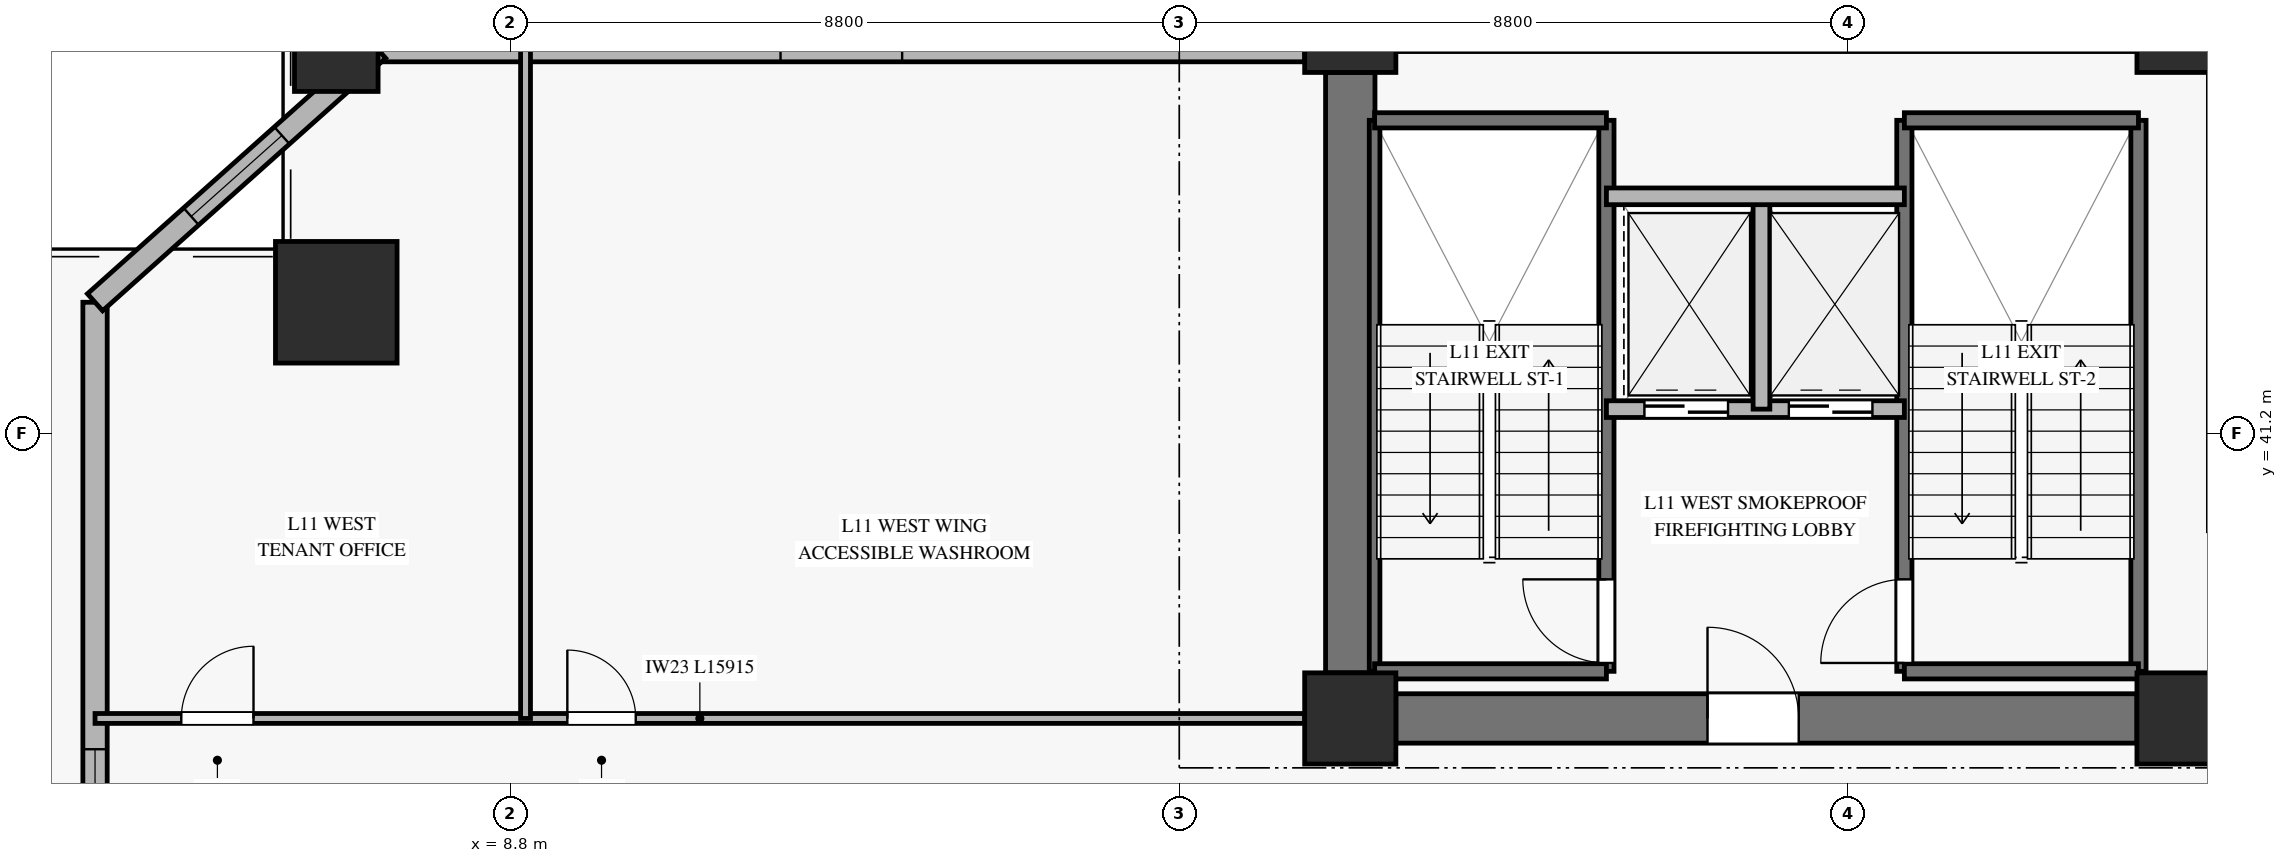
"""IFC4 building model, lengths in metres.
Left out: names, types, materials, properties, quantities, classifications, styles, units other than length and angle.
Written with IfcOpenShell. Run it as: python <this file> out.ifc"""

import sys

from ifc_helpers import new_model, si_unit, direction, frame, frame_2d, origin, origin_2d, place, context, subcontext, project, spatial, rectangle, hollow_rectangle, extrude, source, transform, mapped, element, fill, save


model = new_model("IFC4")
c1 = context("Model", 3, precision=1e-05, world=origin(), true_north=direction((0.0, 1.0)))
c2 = subcontext(c1, "Body", "Model", "MODEL_VIEW")
j1 = project(units=[si_unit("LENGTHUNIT", "METRE"), si_unit("PLANEANGLEUNIT", "RADIAN")], contexts=[c1])
p1 = place(None, origin())
s1 = spatial("IfcSite", under=j1, at=p1, CompositionType="ELEMENT")
p2 = place(p1, origin())
s2 = spatial("IfcBuilding", under=s1, at=p2, CompositionType="ELEMENT")
p3 = place(p2, frame((0.0, 0.0, 44.9)))
s3 = spatial("IfcBuildingStorey", under=s2, at=p3, CompositionType="ELEMENT", Elevation=44.9)
m1 = source(origin(), c2, "Body", "SweptSolid", [
    extrude(rectangle(XDim=1.2, YDim=1.2, at=origin_2d()), origin(), (0.0, 0.0, 1.0), 3.62),
])
for number, where, z_axis, x_axis in (
    (1, (19.85, 37.45, 0.0), (0.0, 0.0, 1.0), (1.0, 0.0, 0.0)),
    (2, (19.85, 46.55, 0.0), (0.0, 0.0, 1.0), (1.0, 0.0, 0.0)),
    (3, (30.8, 37.45, 0.0), (0.0, 0.0, 1.0), (1.0, 0.0, 0.0)),
    (4, (30.8, 46.55, 0.0), (0.0, 0.0, 1.0), (1.0, 0.0, 0.0)),
):
    element("IfcColumn", number, at=place(p3, frame(where, z_axis=z_axis, x_axis=x_axis)), inside=s3, PredefinedType="PILASTER", context=c2, shape_type="MappedRepresentation", body=[
        mapped(m1, transform((0.0, 0.0, 0.0), x_axis=(1.0, 0.0, 0.0), y_axis=(0.0, 1.0, 0.0), z_axis=(0.0, 0.0, 1.0), scale=1.0)),
    ])
p4 = place(p3, frame((20.45, 37.45, 0.0), z_axis=(0.0, 0.0, 1.0), x_axis=(1.0, 0.0, 0.0)))
e5 = element("IfcWall", 5, at=p4, inside=s3, PredefinedType="SHEAR", context=c2, shape_type="SweptSolid", body=[
    extrude(rectangle(XDim=9.75, YDim=0.65, at=frame_2d((4.875, 0.0))), origin(), (0.0, 0.0, 1.0), 3.62),
])
p5 = place(p4, frame((4.1, 0.0, 0.0)))
e6 = element("IfcOpeningElement", 6, at=p5, cuts=e5, PredefinedType="OPENING", context=c2, shape_type="SweptSolid", body=[
    extrude(rectangle(XDim=1.2, YDim=2.15, at=frame_2d((0.6, 1.075))), frame((0.0, 0.335, 0.0), z_axis=(0.0, -1.0, 0.0), x_axis=(1.0, 0.0, 0.0)), (0.0, 0.0, 1.0), 0.67),
])
p6 = place(p3, frame((19.85, 38.05, 0.0), z_axis=(0.0, 0.0, 1.0), x_axis=(0.0, 1.0, 0.0)))
e7 = element("IfcWall", 7, at=p6, inside=s3, PredefinedType="SHEAR", context=c2, shape_type="SweptSolid", body=[
    extrude(rectangle(XDim=7.9, YDim=0.65, at=frame_2d((3.95, 0.0))), origin(), (0.0, 0.0, 1.0), 3.62),
])
m2 = source(origin(), c2, "Body", "SweptSolid", [
    extrude(hollow_rectangle(XDim=1.6, YDim=1.6, WallThickness=0.075, at=origin_2d()), origin(), (0.0, 0.0, 1.0), 3.626),
])
p7 = place(p3, frame((6.509, 42.926, 0.0), z_axis=(0.057631200614, 0.007136573908, 0.998312433073), x_axis=(-0.122893119903, 0.992419911671, 0.0)))
e8 = element("IfcColumn", 8, at=p7, inside=s3, PredefinedType="COLUMN", context=c2, shape_type="MappedRepresentation", body=[
    mapped(m2, transform((0.0, 0.0, 0.0), x_axis=(1.0, 0.0, 0.0), y_axis=(0.0, 1.0, 0.0), z_axis=(0.0, 0.0, 1.0), scale=1.0)),
])
m3 = source(origin(), c2, "Body", "SweptSolid", [
    extrude(hollow_rectangle(XDim=1.1, YDim=1.1, WallThickness=0.05, at=origin_2d()), origin(), (0.0, 0.0, 1.0), 3.626),
])
p8 = place(p3, frame((6.509, 46.25, 0.0), z_axis=(0.057632668269, 0.0, 0.998337856413), x_axis=(0.0, 1.0, 0.0)))
e9 = element("IfcColumn", 9, at=p8, inside=s3, PredefinedType="COLUMN", context=c2, shape_type="MappedRepresentation", body=[
    mapped(m3, transform((0.0, 0.0, 0.0), x_axis=(1.0, 0.0, 0.0), y_axis=(0.0, 1.0, 0.0), z_axis=(0.0, 0.0, 1.0), scale=1.0)),
])
p9 = place(p3, frame((3.335, 25.513, 0.0), z_axis=(0.0, 0.0, 1.0), x_axis=(0.0, 1.0, 0.0)))
e10 = element("IfcWall", 10, at=p9, inside=s3, PredefinedType="SOLIDWALL", context=c2, shape_type="SweptSolid", body=[
    extrude(rectangle(XDim=17.413, YDim=0.32, at=frame_2d((8.707, 0.0))), origin(), (0.0, 0.0, 1.0), 3.1),
])
p10 = place(p9, frame((9.132, 0.0, 0.45)))
e11 = element("IfcOpeningElement", 11, at=p10, cuts=e10, PredefinedType="OPENING", context=c2, shape_type="SweptSolid", body=[
    extrude(rectangle(XDim=2.4, YDim=2.1, at=frame_2d((1.2, 1.05))), frame((0.0, 0.17, 0.0), z_axis=(0.0, -1.0, 0.0), x_axis=(1.0, 0.0, 0.0)), (0.0, 0.0, 1.0), 0.34),
])
p11 = place(p3, frame((7.059, 46.25, 0.0), z_axis=(0.0, 0.0, 1.0), x_axis=(1.0, 0.0, 0.0)))
e12 = element("IfcWall", 12, at=p11, inside=s3, PredefinedType="SOLIDWALL", context=c2, shape_type="SweptSolid", body=[
    extrude(rectangle(XDim=12.191, YDim=0.32, at=frame_2d((6.095, 0.0))), origin(), (0.0, 0.0, 1.0), 3.1),
])
p12 = place(p11, frame((5.295, 0.0, 0.45)))
e13 = element("IfcOpeningElement", 13, at=p12, cuts=e12, PredefinedType="OPENING", context=c2, shape_type="SweptSolid", body=[
    extrude(rectangle(XDim=1.6, YDim=2.0, at=frame_2d((0.8, 1.0))), frame((0.0, 0.17, 0.0), z_axis=(0.0, -1.0, 0.0), x_axis=(1.0, 0.0, 0.0)), (0.0, 0.0, 1.0), 0.34),
])
p13 = place(p3, frame((7.059, 46.25, 0.0), z_axis=(0.0, 0.0, 1.0), x_axis=(-0.746050463323, -0.665889409869, 0.0)))
e14 = element("IfcWall", 14, at=p13, inside=s3, PredefinedType="SOLIDWALL", context=c2, shape_type="SweptSolid", body=[
    extrude(rectangle(XDim=4.992, YDim=0.3, at=frame_2d((2.496, 0.0))), origin(), (0.0, 0.0, 1.0), 3.1),
])
p14 = place(p13, frame((1.696, 0.0, 0.45)))
e15 = element("IfcOpeningElement", 15, at=p14, cuts=e14, PredefinedType="OPENING", context=c2, shape_type="SweptSolid", body=[
    extrude(rectangle(XDim=1.6, YDim=2.0, at=frame_2d((0.8, 1.0))), frame((0.0, 0.16, 0.0), z_axis=(0.0, -1.0, 0.0), x_axis=(1.0, 0.0, 0.0)), (0.0, 0.0, 1.0), 0.32),
])
p15 = place(p3, frame((20.17, 38.07, 0.0), z_axis=(0.0, 0.0, 1.0), x_axis=(0.0, 1.0, 0.0)))
e16 = element("IfcWall", 16, at=p15, inside=s3, PredefinedType="SOLIDWALL", context=c2, shape_type="SweptSolid", body=[
    extrude(rectangle(XDim=7.25, YDim=0.14, at=frame_2d((3.625, 0.0))), origin(), (0.0, 0.0, 1.0), 3.9),
])
p16 = place(p3, frame((23.22, 38.07, 0.0), z_axis=(0.0, 0.0, 1.0), x_axis=(0.0, 1.0, 0.0)))
e17 = element("IfcWall", 17, at=p16, inside=s3, PredefinedType="SOLIDWALL", context=c2, shape_type="SweptSolid", body=[
    extrude(rectangle(XDim=7.25, YDim=0.2, at=frame_2d((3.625, 0.0))), origin(), (0.0, 0.0, 1.0), 3.9),
])
p17 = place(p16, frame((0.11, 0.0, 0.0)))
e18 = element("IfcOpeningElement", 18, at=p17, cuts=e17, PredefinedType="OPENING", context=c2, shape_type="SweptSolid", body=[
    extrude(rectangle(XDim=1.1, YDim=2.15, at=frame_2d((0.55, 1.075))), frame((0.0, 0.11, 0.0), z_axis=(0.0, -1.0, 0.0), x_axis=(1.0, 0.0, 0.0)), (0.0, 0.0, 1.0), 0.22),
])
for number, where, z_axis, x_axis in (
    (19, (20.17, 45.32, 0.0), (0.0, 0.0, 1.0), (1.0, 0.0, 0.0)),
    (20, (20.17, 38.07, 0.0), (0.0, 0.0, 1.0), (1.0, 0.0, 0.0)),
):
    element("IfcWall", number, at=place(p3, frame(where, z_axis=z_axis, x_axis=x_axis)), inside=s3, PredefinedType="SOLIDWALL", context=c2, shape_type="SweptSolid", body=[
        extrude(rectangle(XDim=3.05, YDim=0.2, at=frame_2d((1.525, 0.0))), origin(), (0.0, 0.0, 1.0), 3.9),
    ])
p18 = place(p3, frame((27.14, 38.07, 0.0), z_axis=(0.0, 0.0, 1.0), x_axis=(0.0, 1.0, 0.0)))
e21 = element("IfcWall", 21, at=p18, inside=s3, PredefinedType="SOLIDWALL", context=c2, shape_type="SweptSolid", body=[
    extrude(rectangle(XDim=7.25, YDim=0.2, at=frame_2d((3.625, 0.0))), origin(), (0.0, 0.0, 1.0), 3.9),
])
p19 = place(p18, frame((0.11, 0.0, 0.0)))
e22 = element("IfcOpeningElement", 22, at=p19, cuts=e21, PredefinedType="OPENING", context=c2, shape_type="SweptSolid", body=[
    extrude(rectangle(XDim=1.1, YDim=2.15, at=frame_2d((0.55, 1.075))), frame((0.0, 0.11, 0.0), z_axis=(0.0, -1.0, 0.0), x_axis=(1.0, 0.0, 0.0)), (0.0, 0.0, 1.0), 0.22),
])
p20 = place(p3, frame((30.22, 38.07, 0.0), z_axis=(0.0, 0.0, 1.0), x_axis=(0.0, 1.0, 0.0)))
e23 = element("IfcWall", 23, at=p20, inside=s3, PredefinedType="SOLIDWALL", context=c2, shape_type="SweptSolid", body=[
    extrude(rectangle(XDim=7.25, YDim=0.2, at=frame_2d((3.625, 0.0))), origin(), (0.0, 0.0, 1.0), 3.9),
])
for number, where, z_axis, x_axis in (
    (24, (27.14, 45.32, 0.0), (0.0, 0.0, 1.0), (1.0, 0.0, 0.0)),
    (25, (27.14, 38.07, 0.0), (0.0, 0.0, 1.0), (1.0, 0.0, 0.0)),
):
    element("IfcWall", number, at=place(p3, frame(where, z_axis=z_axis, x_axis=x_axis)), inside=s3, PredefinedType="SOLIDWALL", context=c2, shape_type="SweptSolid", body=[
        extrude(rectangle(XDim=3.08, YDim=0.2, at=frame_2d((1.54, 0.0))), origin(), (0.0, 0.0, 1.0), 3.9),
    ])
p21 = place(p3, frame((23.22, 41.52, 0.0), z_axis=(0.0, 0.0, 1.0), x_axis=(1.0, 0.0, 0.0)))
e26 = element("IfcWall", 26, at=p21, inside=s3, PredefinedType="SOLIDWALL", context=c2, shape_type="SweptSolid", body=[
    extrude(rectangle(XDim=3.92, YDim=0.22, at=frame_2d((1.96, 0.0))), origin(), (0.0, 0.0, 1.0), 3.62),
])
p22 = place(p21, frame((0.5, 0.0, 0.0)))
e27 = element("IfcOpeningElement", 27, at=p22, cuts=e26, PredefinedType="OPENING", context=c2, shape_type="SweptSolid", body=[
    extrude(rectangle(XDim=1.1, YDim=2.2, at=frame_2d((0.55, 1.1))), frame((0.0, 0.12, 0.0), z_axis=(0.0, -1.0, 0.0), x_axis=(1.0, 0.0, 0.0)), (0.0, 0.0, 1.0), 0.24),
])
p23 = place(p21, frame((2.4, 0.0, 0.0)))
e28 = element("IfcOpeningElement", 28, at=p23, cuts=e26, PredefinedType="OPENING", context=c2, shape_type="SweptSolid", body=[
    extrude(rectangle(XDim=1.1, YDim=2.2, at=frame_2d((0.55, 1.1))), frame((0.0, 0.12, 0.0), z_axis=(0.0, -1.0, 0.0), x_axis=(1.0, 0.0, 0.0)), (0.0, 0.0, 1.0), 0.24),
])
p24 = place(p3, frame((25.26, 41.52, 0.0), z_axis=(0.0, 0.0, 1.0), x_axis=(0.0, 1.0, 0.0)))
e29 = element("IfcWall", 29, at=p24, inside=s3, PredefinedType="SOLIDWALL", context=c2, shape_type="SweptSolid", body=[
    extrude(rectangle(XDim=2.8, YDim=0.22, at=frame_2d((1.4, 0.0))), origin(), (0.0, 0.0, 1.0), 3.62),
])
p25 = place(p3, frame((23.22, 44.32, 0.0), z_axis=(0.0, 0.0, 1.0), x_axis=(1.0, 0.0, 0.0)))
e30 = element("IfcWall", 30, at=p25, inside=s3, PredefinedType="SOLIDWALL", context=c2, shape_type="SweptSolid", body=[
    extrude(rectangle(XDim=3.92, YDim=0.22, at=frame_2d((1.96, 0.0))), origin(), (0.0, 0.0, 1.0), 3.62),
])
p26 = place(p3, frame((3.335, 37.45, 0.0), z_axis=(0.0, 0.0, 1.0), x_axis=(1.0, 0.0, 0.0)))
e31 = element("IfcWall", 31, at=p26, inside=s3, PredefinedType="PARTITIONING", context=c2, shape_type="SweptSolid", body=[
    extrude(rectangle(XDim=15.915, YDim=0.13, at=frame_2d((7.958, 0.0))), origin(), (0.0, 0.0, 1.0), 3.105),
])
p27 = place(p26, frame((1.135, 0.0, 0.0)))
e32 = element("IfcOpeningElement", 32, at=p27, cuts=e31, PredefinedType="OPENING", context=c2, shape_type="SweptSolid", body=[
    extrude(rectangle(XDim=0.95, YDim=2.1, at=frame_2d((0.475, 1.05))), frame((0.0, 0.075, 0.0), z_axis=(0.0, -1.0, 0.0), x_axis=(1.0, 0.0, 0.0)), (0.0, 0.0, 1.0), 0.15),
])
p28 = place(p26, frame((6.214, 0.0, 0.0)))
e33 = element("IfcOpeningElement", 33, at=p28, cuts=e31, PredefinedType="OPENING", context=c2, shape_type="SweptSolid", body=[
    extrude(rectangle(XDim=0.9, YDim=2.1, at=frame_2d((0.45, 1.05))), frame((0.0, 0.075, 0.0), z_axis=(0.0, -1.0, 0.0), x_axis=(1.0, 0.0, 0.0)), (0.0, 0.0, 1.0), 0.15),
])
p29 = place(p3, frame((8.999, 37.45, 0.0), z_axis=(0.0, 0.0, 1.0), x_axis=(0.0, 1.0, 0.0)))
e34 = element("IfcWall", 34, at=p29, inside=s3, PredefinedType="PARTITIONING", context=c2, shape_type="SweptSolid", body=[
    extrude(rectangle(XDim=8.8, YDim=0.13, at=frame_2d((4.4, 0.0))), origin(), (0.0, 0.0, 1.0), 3.62),
])
m4 = source(origin(), c2, "Body", "SweptSolid", [
    extrude(rectangle(XDim=2.4, YDim=2.1, at=frame_2d((1.2, 1.05))), frame((0.0, 0.03, 0.0), z_axis=(0.0, -1.0, 0.0), x_axis=(1.0, 0.0, 0.0)), (0.0, 0.0, 1.0), 0.06),
])
p30 = place(p10, origin())
e35 = element("IfcWindow", 35, at=p30, inside=s3, PartitioningType="SINGLE_PANEL", PredefinedType="WINDOW", context=c2, shape_type="MappedRepresentation", body=[
    mapped(m4, transform((0.0, 0.0, 0.0), x_axis=(1.0, 0.0, 0.0), y_axis=(0.0, 1.0, 0.0), z_axis=(0.0, 0.0, 1.0), scale=1.0)),
])
fill(e11, e35)
m5 = source(origin(), c2, "Body", "SweptSolid", [
    extrude(rectangle(XDim=1.6, YDim=2.0, at=frame_2d((0.8, 1.0))), frame((0.0, 0.03, 0.0), z_axis=(0.0, -1.0, 0.0), x_axis=(1.0, 0.0, 0.0)), (0.0, 0.0, 1.0), 0.06),
])
p31 = place(p14, origin())
e36 = element("IfcWindow", 36, at=p31, inside=s3, PartitioningType="SINGLE_PANEL", PredefinedType="WINDOW", context=c2, shape_type="MappedRepresentation", body=[
    mapped(m5, transform((0.0, 0.0, 0.0), x_axis=(1.0, 0.0, 0.0), y_axis=(0.0, 1.0, 0.0), z_axis=(0.0, 0.0, 1.0), scale=1.0)),
])
fill(e15, e36)
m6 = source(origin(), c2, "Body", "SweptSolid", [
    extrude(rectangle(XDim=1.1, YDim=2.15, at=frame_2d((0.55, 1.075))), frame((0.0, 0.025, 0.0), z_axis=(0.0, -1.0, 0.0), x_axis=(1.0, 0.0, 0.0)), (0.0, 0.0, 1.0), 0.05),
])
p32 = place(p17, origin())
e37 = element("IfcDoor", 37, at=p32, inside=s3, OperationType="SINGLE_SWING_RIGHT", PredefinedType="DOOR", context=c2, shape_type="MappedRepresentation", body=[
    mapped(m6, transform((0.0, 0.0, 0.0), x_axis=(1.0, 0.0, 0.0), y_axis=(0.0, 1.0, 0.0), z_axis=(0.0, 0.0, 1.0), scale=1.0)),
])
fill(e18, e37)
p33 = place(p19, origin())
e38 = element("IfcDoor", 38, at=p33, inside=s3, OperationType="SINGLE_SWING_LEFT", PredefinedType="DOOR", context=c2, shape_type="MappedRepresentation", body=[
    mapped(m6, transform((0.0, 0.0, 0.0), x_axis=(1.0, 0.0, 0.0), y_axis=(0.0, 1.0, 0.0), z_axis=(0.0, 0.0, 1.0), scale=1.0)),
])
fill(e22, e38)
m7 = source(origin(), c2, "Body", "SweptSolid", [
    extrude(rectangle(XDim=1.1, YDim=2.2, at=frame_2d((0.55, 1.1))), frame((0.0, 0.025, 0.0), z_axis=(0.0, -1.0, 0.0), x_axis=(1.0, 0.0, 0.0)), (0.0, 0.0, 1.0), 0.05),
])
p34 = place(p22, origin())
e39 = element("IfcDoor", 39, at=p34, inside=s3, OperationType="SLIDING_TO_LEFT", PredefinedType="DOOR", context=c2, shape_type="MappedRepresentation", body=[
    mapped(m7, transform((0.0, 0.0, 0.0), x_axis=(1.0, 0.0, 0.0), y_axis=(0.0, 1.0, 0.0), z_axis=(0.0, 0.0, 1.0), scale=1.0)),
])
fill(e27, e39)
p35 = place(p23, origin())
e40 = element("IfcDoor", 40, at=p35, inside=s3, OperationType="SLIDING_TO_LEFT", PredefinedType="DOOR", context=c2, shape_type="MappedRepresentation", body=[
    mapped(m7, transform((0.0, 0.0, 0.0), x_axis=(1.0, 0.0, 0.0), y_axis=(0.0, 1.0, 0.0), z_axis=(0.0, 0.0, 1.0), scale=1.0)),
])
fill(e28, e40)
m8 = source(origin(), c2, "Body", "SweptSolid", [
    extrude(rectangle(XDim=1.2, YDim=2.15, at=frame_2d((0.6, 1.075))), frame((0.0, 0.025, 0.0), z_axis=(0.0, -1.0, 0.0), x_axis=(1.0, 0.0, 0.0)), (0.0, 0.0, 1.0), 0.05),
])
p36 = place(p5, origin())
e41 = element("IfcDoor", 41, at=p36, inside=s3, OperationType="SINGLE_SWING_LEFT", PredefinedType="DOOR", context=c2, shape_type="MappedRepresentation", body=[
    mapped(m8, transform((0.0, 0.0, 0.0), x_axis=(1.0, 0.0, 0.0), y_axis=(0.0, 1.0, 0.0), z_axis=(0.0, 0.0, 1.0), scale=1.0)),
])
fill(e6, e41)
m9 = source(origin(), c2, "Body", "SweptSolid", [
    extrude(rectangle(XDim=0.95, YDim=2.1, at=frame_2d((0.475, 1.05))), frame((0.0, 0.025, 0.0), z_axis=(0.0, -1.0, 0.0), x_axis=(1.0, 0.0, 0.0)), (0.0, 0.0, 1.0), 0.05),
])
p37 = place(p27, origin())
e42 = element("IfcDoor", 42, at=p37, inside=s3, OperationType="SINGLE_SWING_RIGHT", PredefinedType="DOOR", context=c2, shape_type="MappedRepresentation", body=[
    mapped(m9, transform((0.0, 0.0, 0.0), x_axis=(1.0, 0.0, 0.0), y_axis=(0.0, 1.0, 0.0), z_axis=(0.0, 0.0, 1.0), scale=1.0)),
])
fill(e32, e42)
m10 = source(origin(), c2, "Body", "SweptSolid", [
    extrude(rectangle(XDim=0.9, YDim=2.1, at=frame_2d((0.45, 1.05))), frame((0.0, 0.025, 0.0), z_axis=(0.0, -1.0, 0.0), x_axis=(1.0, 0.0, 0.0)), (0.0, 0.0, 1.0), 0.05),
])
p38 = place(p28, origin())
e43 = element("IfcDoor", 43, at=p38, inside=s3, OperationType="SINGLE_SWING_LEFT", PredefinedType="DOOR", context=c2, shape_type="MappedRepresentation", body=[
    mapped(m10, transform((0.0, 0.0, 0.0), x_axis=(1.0, 0.0, 0.0), y_axis=(0.0, 1.0, 0.0), z_axis=(0.0, 0.0, 1.0), scale=1.0)),
])
fill(e33, e43)
save(model, sys.argv[1])
